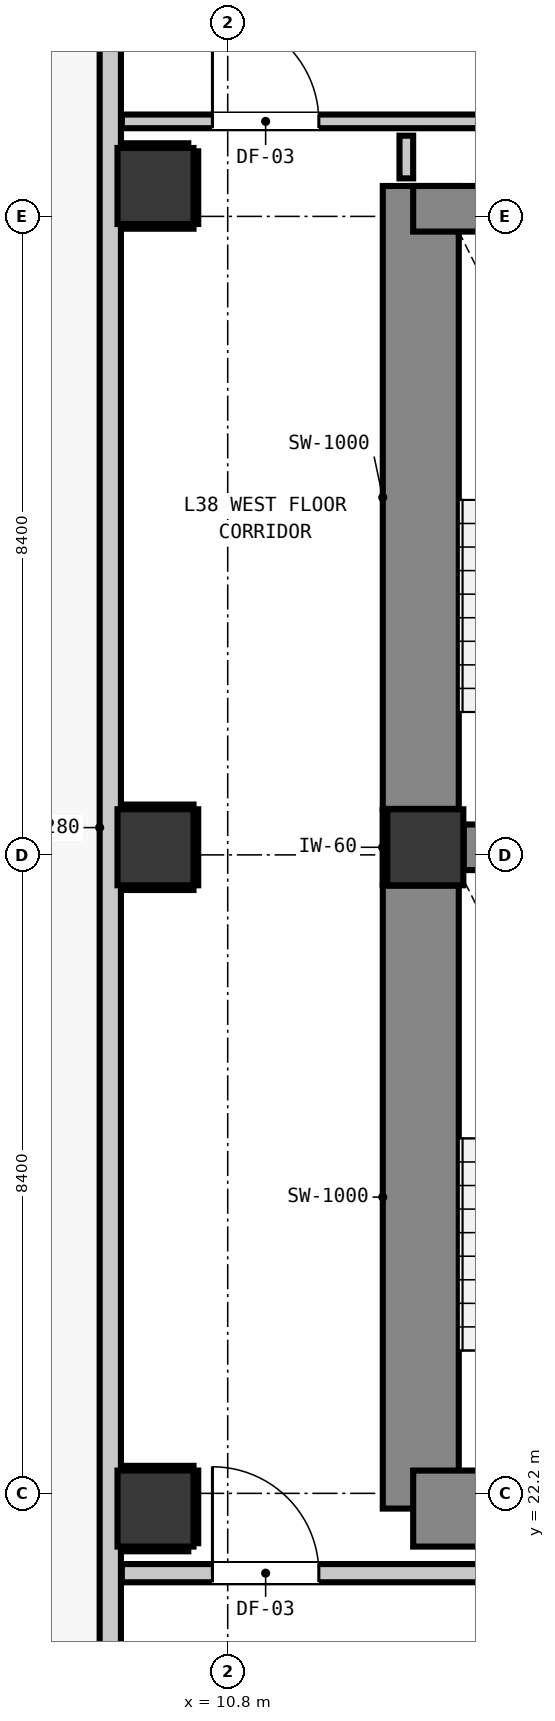
"""IFC4 building model, lengths in metres.
Left out: names, types, materials, properties, quantities, classifications, styles, units other than length and angle.
Written with IfcOpenShell. Run it as: python <this file> out.ifc"""

import sys

from ifc_helpers import new_model, si_unit, direction, frame, frame_2d, origin, origin_2d, place, context, subcontext, project, spatial, rectangle, extrude, element, fill, save


model = new_model("IFC4")
c1 = context("Model", 3, precision=1e-05, world=origin(), true_north=direction((0.0, 1.0)))
c2 = subcontext(c1, "Body", "Model", "MODEL_VIEW")
j1 = project(units=[si_unit("LENGTHUNIT", "METRE"), si_unit("PLANEANGLEUNIT", "RADIAN")], contexts=[c1])
p1 = place(None, origin())
s1 = spatial("IfcSite", under=j1, at=p1, CompositionType="ELEMENT")
p2 = place(p1, origin())
s2 = spatial("IfcBuilding", under=s1, at=p2, CompositionType="ELEMENT")
p3 = place(p2, frame((0.0, 0.0, 132.64)))
s3 = spatial("IfcBuildingStorey", under=s2, at=p3, CompositionType="ELEMENT", Elevation=132.64)
p4 = place(p3, frame((13.4, 30.7, 0.0), z_axis=(0.0, 0.0, 1.0), x_axis=(1.0, 0.0, 0.0)))
e1 = element("IfcColumn", 1, at=p4, inside=s3, PredefinedType="COLUMN", context=c2, shape_type="SweptSolid", body=[
    extrude(rectangle(XDim=1.0, YDim=1.0, at=origin_2d()), origin(), (0.0, 0.0, 1.0), 3.32),
])
p5 = place(p3, frame((13.34, 22.0, 0.0), z_axis=(0.0, 0.0, 1.0), x_axis=(0.0, 1.0, 0.0)))
e2 = element("IfcWall", 2, at=p5, inside=s3, PredefinedType="SHEAR", context=c2, shape_type="SweptSolid", body=[
    extrude(rectangle(XDim=8.195, YDim=1.0, at=frame_2d((4.098, 0.0))), origin(), (0.0, 0.0, 1.0), 3.32),
])
p6 = place(p3, frame((13.34, 31.205, 0.0), z_axis=(0.0, 0.0, 1.0), x_axis=(0.0, 1.0, 0.0)))
e3 = element("IfcWall", 3, at=p6, inside=s3, PredefinedType="SHEAR", context=c2, shape_type="SweptSolid", body=[
    extrude(rectangle(XDim=8.195, YDim=1.0, at=frame_2d((4.097, 0.0))), origin(), (0.0, 0.0, 1.0), 3.32),
])
p7 = place(p3, frame((13.24, 22.0, 0.0), z_axis=(0.0, 0.0, 1.0), x_axis=(1.0, 0.0, 0.0)))
e4 = element("IfcWall", 4, at=p7, inside=s3, PredefinedType="SHEAR", context=c2, shape_type="SweptSolid", body=[
    extrude(rectangle(XDim=4.08, YDim=1.0, at=frame_2d((2.04, 0.0))), origin(), (0.0, 0.0, 1.0), 3.32),
])
p8 = place(p3, frame((13.24, 39.1, 0.0), z_axis=(0.0, 0.0, 1.0), x_axis=(1.0, 0.0, 0.0)))
e5 = element("IfcWall", 5, at=p8, inside=s3, PredefinedType="SHEAR", context=c2, shape_type="SweptSolid", body=[
    extrude(rectangle(XDim=4.08, YDim=0.6, at=frame_2d((2.04, 0.0))), origin(), (0.0, 0.0, 1.0), 3.32),
])
p9 = place(p3, frame((13.905, 30.7, 0.0), z_axis=(0.0, 0.0, 1.0), x_axis=(1.0, 0.0, 0.0)))
e6 = element("IfcWall", 6, at=p9, inside=s3, PredefinedType="SHEAR", context=c2, shape_type="SweptSolid", body=[
    extrude(rectangle(XDim=3.415, YDim=0.6, at=frame_2d((1.708, 0.0))), origin(), (0.0, 0.0, 1.0), 3.32),
])
for number, where, z_axis, x_axis in (
    (7, (9.85, 22.0, 0.0), (0.0, 0.0, 1.0), (1.0, 0.0, 0.0)),
    (8, (9.85, 30.7, 0.0), (0.0, 0.0, 1.0), (1.0, 0.0, 0.0)),
    (9, (9.85, 39.4, 0.0), (0.0, 0.0, 1.0), (1.0, 0.0, 0.0)),
):
    element("IfcColumn", number, at=place(p3, frame(where, z_axis=z_axis, x_axis=x_axis)), inside=s3, PredefinedType="COLUMN", context=c2, shape_type="SweptSolid", body=[
        extrude(rectangle(XDim=1.0, YDim=1.0, at=origin_2d()), origin(), (0.0, 0.0, 1.0), 3.32),
    ])
p10 = place(p3, frame((9.255, 11.355, 0.0), z_axis=(0.0, 0.0, 1.0), x_axis=(0.0, 1.0, 0.0)))
e10 = element("IfcWall", 10, at=p10, inside=s3, PredefinedType="STANDARD", context=c2, shape_type="SweptSolid", body=[
    extrude(rectangle(XDim=32.29, YDim=0.28, at=frame_2d((16.145, 0.0))), origin(), (0.0, 0.0, 1.0), 3.08),
])
p11 = place(p10, frame((5.818, 0.0, 0.0)))
e11 = element("IfcOpeningElement", 11, at=p11, cuts=e10, PredefinedType="OPENING", context=c2, shape_type="SweptSolid", body=[
    extrude(rectangle(XDim=1.0, YDim=2.15, at=frame_2d((0.5, 1.075))), frame((0.0, 0.15, 0.0), z_axis=(0.0, -1.0, 0.0), x_axis=(1.0, 0.0, 0.0)), (0.0, 0.0, 1.0), 0.3),
])
p12 = place(p10, frame((0.544, 0.0, 0.85)))
e12 = element("IfcOpeningElement", 12, at=p12, cuts=e10, PredefinedType="OPENING", context=c2, shape_type="SweptSolid", body=[
    extrude(rectangle(XDim=1.05, YDim=1.65, at=frame_2d((0.525, 0.825))), frame((0.0, 0.15, 0.0), z_axis=(0.0, -1.0, 0.0), x_axis=(1.0, 0.0, 0.0)), (0.0, 0.0, 1.0), 0.3),
])
p13 = place(p3, frame((9.407, 21.15, 0.0), z_axis=(0.0, 0.0, 1.0), x_axis=(1.0, 0.0, 0.0)))
e13 = element("IfcWall", 13, at=p13, inside=s3, PredefinedType="PARTITIONING", context=c2, shape_type="SweptSolid", body=[
    extrude(rectangle(XDim=39.386, YDim=0.24, at=frame_2d((19.693, 0.0))), origin(), (0.0, 0.0, 1.0), 3.08),
])
p14 = place(p13, frame((8.803, 0.0, 0.0)))
e14 = element("IfcOpeningElement", 14, at=p14, cuts=e13, PredefinedType="OPENING", context=c2, shape_type="SweptSolid", body=[
    extrude(rectangle(XDim=1.1, YDim=2.15, at=frame_2d((0.55, 1.075))), frame((0.0, 0.13, 0.0), z_axis=(0.0, -1.0, 0.0), x_axis=(1.0, 0.0, 0.0)), (0.0, 0.0, 1.0), 0.26),
])
p15 = place(p13, frame((1.192, 0.0, 0.0)))
e15 = element("IfcOpeningElement", 15, at=p15, cuts=e13, PredefinedType="OPENING", context=c2, shape_type="SweptSolid", body=[
    extrude(rectangle(XDim=1.4, YDim=2.15, at=frame_2d((0.7, 1.075))), frame((0.0, 0.13, 0.0), z_axis=(0.0, -1.0, 0.0), x_axis=(1.0, 0.0, 0.0)), (0.0, 0.0, 1.0), 0.26),
])
p16 = place(p13, frame((28.643, 0.0, 0.0)))
e16 = element("IfcOpeningElement", 16, at=p16, cuts=e13, PredefinedType="OPENING", context=c2, shape_type="SweptSolid", body=[
    extrude(rectangle(XDim=1.4, YDim=2.15, at=frame_2d((0.7, 1.075))), frame((0.0, 0.13, 0.0), z_axis=(0.0, -1.0, 0.0), x_axis=(1.0, 0.0, 0.0)), (0.0, 0.0, 1.0), 0.26),
])
p17 = place(p3, frame((9.407, 40.25, 0.0), z_axis=(0.0, 0.0, 1.0), x_axis=(1.0, 0.0, 0.0)))
e17 = element("IfcWall", 17, at=p17, inside=s3, PredefinedType="PARTITIONING", context=c2, shape_type="SweptSolid", body=[
    extrude(rectangle(XDim=27.536, YDim=0.18, at=frame_2d((13.768, 0.0))), origin(), (0.0, 0.0, 1.0), 3.08),
])
p18 = place(p17, frame((8.028, 0.0, 0.0)))
e18 = element("IfcOpeningElement", 18, at=p18, cuts=e17, PredefinedType="OPENING", context=c2, shape_type="SweptSolid", body=[
    extrude(rectangle(XDim=1.4, YDim=2.15, at=frame_2d((0.7, 1.075))), frame((0.0, 0.1, 0.0), z_axis=(0.0, -1.0, 0.0), x_axis=(1.0, 0.0, 0.0)), (0.0, 0.0, 1.0), 0.2),
])
p19 = place(p17, frame((1.192, 0.0, 0.0)))
e19 = element("IfcOpeningElement", 19, at=p19, cuts=e17, PredefinedType="OPENING", context=c2, shape_type="SweptSolid", body=[
    extrude(rectangle(XDim=1.4, YDim=2.15, at=frame_2d((0.7, 1.075))), frame((0.0, 0.1, 0.0), z_axis=(0.0, -1.0, 0.0), x_axis=(1.0, 0.0, 0.0)), (0.0, 0.0, 1.0), 0.2),
])
p20 = place(p3, frame((13.15, 39.5, 0.0), z_axis=(0.0, 0.0, 1.0), x_axis=(0.0, 1.0, 0.0)))
e20 = element("IfcWall", 20, at=p20, inside=s3, PredefinedType="PARTITIONING", context=c2, shape_type="SweptSolid", body=[
    extrude(rectangle(XDim=0.562, YDim=0.18, at=frame_2d((0.281, 0.0))), origin(), (0.0, 0.0, 1.0), 2.315),
])
p21 = place(p3, frame((12.868, 30.21, 0.0), z_axis=(0.0, 0.0, 1.0), x_axis=(0.0, 1.0, 0.0)))
e21 = element("IfcWall", 21, at=p21, inside=s3, PredefinedType="PARTITIONING", context=c2, shape_type="SweptSolid", body=[
    extrude(rectangle(XDim=0.98, YDim=0.06, at=frame_2d((0.49, 0.0))), origin(), (0.0, 0.0, 1.0), 1.45),
])
p22 = place(p3, frame((9.41, 21.468, 0.0), z_axis=(0.0, 0.0, 1.0), x_axis=(1.0, 0.0, 0.0)))
e22 = element("IfcWall", 22, at=p22, inside=s3, PredefinedType="PARTITIONING", context=c2, shape_type="SweptSolid", body=[
    extrude(rectangle(XDim=0.871, YDim=0.06, at=frame_2d((0.436, 0.0))), origin(), (0.0, 0.0, 1.0), 1.45),
])
p23 = place(p3, frame((9.41, 22.532, 0.0), z_axis=(0.0, 0.0, 1.0), x_axis=(1.0, 0.0, 0.0)))
e23 = element("IfcWall", 23, at=p23, inside=s3, PredefinedType="PARTITIONING", context=c2, shape_type="SweptSolid", body=[
    extrude(rectangle(XDim=0.94, YDim=0.06, at=frame_2d((0.47, 0.0))), origin(), (0.0, 0.0, 1.0), 1.45),
])
p24 = place(p3, frame((10.382, 21.544, 0.0), z_axis=(0.0, 0.0, 1.0), x_axis=(0.0, 1.0, 0.0)))
e24 = element("IfcWall", 24, at=p24, inside=s3, PredefinedType="PARTITIONING", context=c2, shape_type="SweptSolid", body=[
    extrude(rectangle(XDim=0.956, YDim=0.06, at=frame_2d((0.478, 0.0))), origin(), (0.0, 0.0, 1.0), 1.45),
])
for number, where, z_axis, x_axis in (
    (25, (9.41, 30.168, 0.0), (0.0, 0.0, 1.0), (1.0, 0.0, 0.0)),
    (26, (9.41, 31.232, 0.0), (0.0, 0.0, 1.0), (1.0, 0.0, 0.0)),
):
    element("IfcWall", number, at=place(p3, frame(where, z_axis=z_axis, x_axis=x_axis)), inside=s3, PredefinedType="PARTITIONING", context=c2, shape_type="SweptSolid", body=[
        extrude(rectangle(XDim=0.94, YDim=0.06, at=frame_2d((0.47, 0.0))), origin(), (0.0, 0.0, 1.0), 1.45),
    ])
p25 = place(p3, frame((10.382, 30.2, 0.0), z_axis=(0.0, 0.0, 1.0), x_axis=(0.0, 1.0, 0.0)))
e27 = element("IfcWall", 27, at=p25, inside=s3, PredefinedType="PARTITIONING", context=c2, shape_type="SweptSolid", body=[
    extrude(rectangle(XDim=1.0, YDim=0.06, at=frame_2d((0.5, 0.0))), origin(), (0.0, 0.0, 1.0), 1.45),
])
p26 = place(p3, frame((9.41, 38.868, 0.0), z_axis=(0.0, 0.0, 1.0), x_axis=(1.0, 0.0, 0.0)))
e28 = element("IfcWall", 28, at=p26, inside=s3, PredefinedType="PARTITIONING", context=c2, shape_type="SweptSolid", body=[
    extrude(rectangle(XDim=0.94, YDim=0.06, at=frame_2d((0.47, 0.0))), origin(), (0.0, 0.0, 1.0), 1.45),
])
p27 = place(p3, frame((9.41, 39.932, 0.0), z_axis=(0.0, 0.0, 1.0), x_axis=(1.0, 0.0, 0.0)))
e29 = element("IfcWall", 29, at=p27, inside=s3, PredefinedType="PARTITIONING", context=c2, shape_type="SweptSolid", body=[
    extrude(rectangle(XDim=0.871, YDim=0.06, at=frame_2d((0.436, 0.0))), origin(), (0.0, 0.0, 1.0), 1.45),
])
p28 = place(p3, frame((10.382, 38.9, 0.0), z_axis=(0.0, 0.0, 1.0), x_axis=(0.0, 1.0, 0.0)))
e30 = element("IfcWall", 30, at=p28, inside=s3, PredefinedType="PARTITIONING", context=c2, shape_type="SweptSolid", body=[
    extrude(rectangle(XDim=0.956, YDim=0.06, at=frame_2d((0.478, 0.0))), origin(), (0.0, 0.0, 1.0), 1.45),
])
p29 = place(p15, origin())
e31 = element("IfcDoor", 31, at=p29, inside=s3, OperationType="SINGLE_SWING_LEFT", PredefinedType="DOOR", context=c2, shape_type="SweptSolid", body=[
    extrude(rectangle(XDim=1.4, YDim=2.15, at=frame_2d((0.7, 1.075))), frame((0.0, 0.025, 0.0), z_axis=(0.0, -1.0, 0.0), x_axis=(1.0, 0.0, 0.0)), (0.0, 0.0, 1.0), 0.05),
])
fill(e15, e31)
p30 = place(p19, origin())
e32 = element("IfcDoor", 32, at=p30, inside=s3, OperationType="SINGLE_SWING_LEFT", PredefinedType="DOOR", context=c2, shape_type="SweptSolid", body=[
    extrude(rectangle(XDim=1.4, YDim=2.15, at=frame_2d((0.7, 1.075))), frame((0.0, 0.025, 0.0), z_axis=(0.0, -1.0, 0.0), x_axis=(1.0, 0.0, 0.0)), (0.0, 0.0, 1.0), 0.05),
])
fill(e19, e32)
save(model, sys.argv[1])
